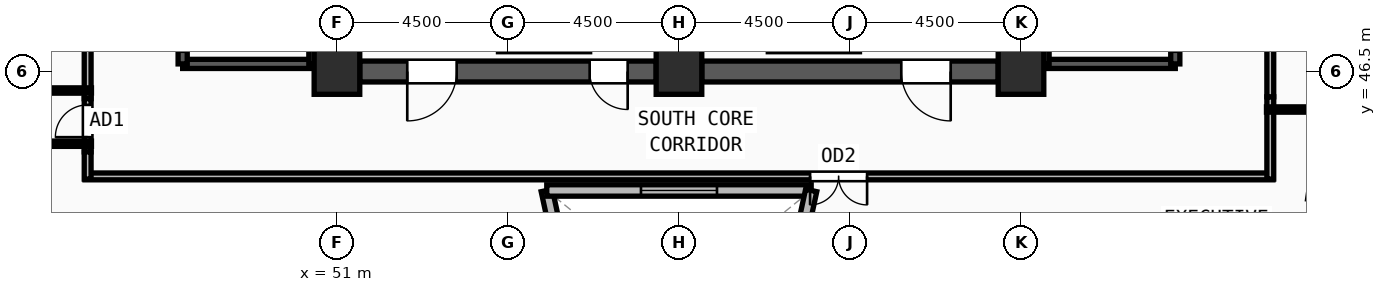
"""IFC4 building model, lengths in metres.
Left out: names, types, materials, properties, quantities, classifications, styles, units other than length and angle.
Written with IfcOpenShell. Run it as: python <this file> out.ifc"""

import sys

from ifc_helpers import new_model, si_unit, direction, frame, frame_2d, origin, origin_2d, place, context, subcontext, project, spatial, rectangle, extrude, source, transform, mapped, element, fill, save


model = new_model("IFC4")
c1 = context("Model", 3, precision=1e-05, world=origin(), true_north=direction((0.0, 1.0)))
c2 = subcontext(c1, "Body", "Model", "MODEL_VIEW")
j1 = project(units=[si_unit("LENGTHUNIT", "METRE"), si_unit("PLANEANGLEUNIT", "RADIAN")], contexts=[c1])
p1 = place(None, origin())
s1 = spatial("IfcSite", under=j1, at=p1, CompositionType="ELEMENT")
p2 = place(p1, origin())
s2 = spatial("IfcBuilding", under=s1, at=p2, CompositionType="ELEMENT")
p3 = place(p2, frame((0.0, 0.0, 297.75)))
s3 = spatial("IfcBuildingStorey", under=s2, at=p3, CompositionType="ELEMENT", Elevation=297.75)
m1 = source(origin(), c2, "Body", "SweptSolid", [
    extrude(rectangle(XDim=1.2, YDim=1.2, at=origin_2d()), origin(), (0.0, 0.0, 1.0), 3.75),
])
for number, where, z_axis, x_axis in (
    (1, (51.0, 46.5, 0.0), (0.0, 0.0, 1.0), (1.0, 0.0, 0.0)),
    (2, (60.0, 46.5, 0.0), (0.0, 0.0, 1.0), (1.0, 0.0, 0.0)),
    (3, (69.0, 46.5, 0.0), (0.0, 0.0, 1.0), (1.0, 0.0, 0.0)),
):
    element("IfcColumn", number, at=place(p3, frame(where, z_axis=z_axis, x_axis=x_axis)), inside=s3, PredefinedType="COLUMN", context=c2, shape_type="MappedRepresentation", body=[
        mapped(m1, transform((0.0, 0.0, 0.0), x_axis=(1.0, 0.0, 0.0), y_axis=(0.0, 1.0, 0.0), z_axis=(0.0, 0.0, 1.0), scale=1.0)),
    ])
p4 = place(p3, frame((39.903, 44.472, 0.0), z_axis=(0.0, 0.0, 1.0), x_axis=(0.556589940211, -0.830787360554, 0.0)))
e4 = element("IfcWall", 4, at=p4, inside=s3, PredefinedType="SOLIDWALL", context=c2, shape_type="SweptSolid", body=[
    extrude(rectangle(XDim=26.693, YDim=0.38, at=frame_2d((13.346, 0.0))), origin(), (0.0, 0.0, 1.0), 3.57),
])
m2 = source(origin(), c2, "Body", "SweptSolid", [
    extrude(rectangle(XDim=1.35, YDim=1.85, at=frame_2d((0.675, 0.925))), frame((0.0, 0.2, 0.0), z_axis=(0.0, -1.0, 0.0), x_axis=(1.0, 0.0, 0.0)), (0.0, 0.0, 1.0), 0.4),
])
p5 = place(p4, frame((5.998, 0.0, 0.55)))
e5 = element("IfcOpeningElement", 5, at=p5, cuts=e4, PredefinedType="OPENING", context=c2, shape_type="MappedRepresentation", body=[
    mapped(m2, transform((0.0, 0.0, 0.0), x_axis=(1.0, 0.0, 0.0), y_axis=(0.0, 1.0, 0.0), z_axis=(0.0, 0.0, 1.0), scale=1.0)),
])
p6 = place(p4, frame((12.671, 0.0, 0.55)))
e6 = element("IfcOpeningElement", 6, at=p6, cuts=e4, PredefinedType="OPENING", context=c2, shape_type="MappedRepresentation", body=[
    mapped(m2, transform((0.0, 0.0, 0.0), x_axis=(1.0, 0.0, 0.0), y_axis=(0.0, 1.0, 0.0), z_axis=(0.0, 0.0, 1.0), scale=1.0)),
])
p7 = place(p4, frame((19.345, 0.0, 0.55)))
e7 = element("IfcOpeningElement", 7, at=p7, cuts=e4, PredefinedType="OPENING", context=c2, shape_type="MappedRepresentation", body=[
    mapped(m2, transform((0.0, 0.0, 0.0), x_axis=(1.0, 0.0, 0.0), y_axis=(0.0, 1.0, 0.0), z_axis=(0.0, 0.0, 1.0), scale=1.0)),
])
p8 = place(p3, frame((68.4, 46.5, 0.0), z_axis=(0.0, 0.0, 1.0), x_axis=(-1.0, 0.0, 0.0)))
e8 = element("IfcWall", 8, at=p8, inside=s3, PredefinedType="SHEAR", context=c2, shape_type="SweptSolid", body=[
    extrude(rectangle(XDim=7.8, YDim=0.55, at=frame_2d((3.9, 0.0))), origin(), (0.0, 0.0, 1.0), 3.57),
])
m3 = source(origin(), c2, "Body", "SweptSolid", [
    extrude(rectangle(XDim=1.3, YDim=2.2, at=frame_2d((0.65, 1.1))), frame((0.0, 0.285, 0.0), z_axis=(0.0, -1.0, 0.0), x_axis=(1.0, 0.0, 0.0)), (0.0, 0.0, 1.0), 0.57),
])
p9 = place(p8, frame((1.25, 0.0, 0.0)))
e9 = element("IfcOpeningElement", 9, at=p9, cuts=e8, PredefinedType="OPENING", context=c2, shape_type="MappedRepresentation", body=[
    mapped(m3, transform((0.0, 0.0, 0.0), x_axis=(1.0, 0.0, 0.0), y_axis=(0.0, 1.0, 0.0), z_axis=(0.0, 0.0, 1.0), scale=1.0)),
])
p10 = place(p3, frame((59.4, 46.5, 0.0), z_axis=(0.0, 0.0, 1.0), x_axis=(-1.0, 0.0, 0.0)))
e10 = element("IfcWall", 10, at=p10, inside=s3, PredefinedType="SHEAR", context=c2, shape_type="SweptSolid", body=[
    extrude(rectangle(XDim=7.8, YDim=0.55, at=frame_2d((3.9, 0.0))), origin(), (0.0, 0.0, 1.0), 3.57),
])
p11 = place(p10, frame((5.25, 0.0, 0.0)))
e11 = element("IfcOpeningElement", 11, at=p11, cuts=e10, PredefinedType="OPENING", context=c2, shape_type="MappedRepresentation", body=[
    mapped(m3, transform((0.0, 0.0, 0.0), x_axis=(1.0, 0.0, 0.0), y_axis=(0.0, 1.0, 0.0), z_axis=(0.0, 0.0, 1.0), scale=1.0)),
])
m4 = source(origin(), c2, "Body", "SweptSolid", [
    extrude(rectangle(XDim=1.0, YDim=2.2, at=frame_2d((0.5, 1.1))), frame((0.0, 0.285, 0.0), z_axis=(0.0, -1.0, 0.0), x_axis=(1.0, 0.0, 0.0)), (0.0, 0.0, 1.0), 0.57),
])
p12 = place(p10, frame((0.75, 0.0, 0.0)))
e12 = element("IfcOpeningElement", 12, at=p12, cuts=e10, PredefinedType="OPENING", context=c2, shape_type="MappedRepresentation", body=[
    mapped(m4, transform((0.0, 0.0, 0.0), x_axis=(1.0, 0.0, 0.0), y_axis=(0.0, 1.0, 0.0), z_axis=(0.0, 0.0, 1.0), scale=1.0)),
])
p13 = place(p3, frame((46.94, 46.7, 0.0), z_axis=(0.0, 0.0, 1.0), x_axis=(1.0, 0.0, 0.0)))
e13 = element("IfcWall", 13, at=p13, inside=s3, PredefinedType="SOLIDWALL", context=c2, shape_type="SweptSolid", body=[
    extrude(rectangle(XDim=3.44, YDim=0.24, at=frame_2d((1.72, 0.0))), origin(), (0.0, 0.0, 1.0), 3.57),
])
p14 = place(p3, frame((50.38, 46.7, 0.0), z_axis=(0.0, 0.0, 1.0), x_axis=(0.0, 1.0, 0.0)))
e14 = element("IfcWall", 14, at=p14, inside=s3, PredefinedType="SOLIDWALL", context=c2, shape_type="SweptSolid", body=[
    extrude(rectangle(XDim=7.82, YDim=0.24, at=frame_2d((3.91, 0.0))), origin(), (0.0, 0.0, 1.0), 3.57),
])
p15 = place(p3, frame((46.94, 54.52, 0.0), z_axis=(0.0, 0.0, 1.0), x_axis=(0.0, -1.0, 0.0)))
e15 = element("IfcWall", 15, at=p15, inside=s3, PredefinedType="SOLIDWALL", context=c2, shape_type="SweptSolid", body=[
    extrude(rectangle(XDim=7.82, YDim=0.24, at=frame_2d((3.91, 0.0))), origin(), (0.0, 0.0, 1.0), 3.57),
])
m5 = source(origin(), c2, "Body", "SweptSolid", [
    extrude(rectangle(XDim=1.2, YDim=2.2, at=frame_2d((0.6, 1.1))), frame((0.0, 0.13, 0.0), z_axis=(0.0, -1.0, 0.0), x_axis=(1.0, 0.0, 0.0)), (0.0, 0.0, 1.0), 0.26),
])
p16 = place(p15, frame((6.3, 0.0, 0.0)))
e16 = element("IfcOpeningElement", 16, at=p16, cuts=e15, PredefinedType="OPENING", context=c2, shape_type="MappedRepresentation", body=[
    mapped(m5, transform((0.0, 0.0, 0.0), x_axis=(1.0, 0.0, 0.0), y_axis=(0.0, 1.0, 0.0), z_axis=(0.0, 0.0, 1.0), scale=1.0)),
])
p17 = place(p3, frame((69.62, 46.7, 0.0), z_axis=(0.0, 0.0, 1.0), x_axis=(1.0, 0.0, 0.0)))
e17 = element("IfcWall", 17, at=p17, inside=s3, PredefinedType="SOLIDWALL", context=c2, shape_type="SweptSolid", body=[
    extrude(rectangle(XDim=3.44, YDim=0.24, at=frame_2d((1.72, 0.0))), origin(), (0.0, 0.0, 1.0), 3.57),
])
p18 = place(p3, frame((73.06, 46.7, 0.0), z_axis=(0.0, 0.0, 1.0), x_axis=(0.0, 1.0, 0.0)))
e18 = element("IfcWall", 18, at=p18, inside=s3, PredefinedType="SOLIDWALL", context=c2, shape_type="SweptSolid", body=[
    extrude(rectangle(XDim=7.82, YDim=0.24, at=frame_2d((3.91, 0.0))), origin(), (0.0, 0.0, 1.0), 3.57),
])
p19 = place(p18, frame((0.32, 0.0, 0.0)))
e19 = element("IfcOpeningElement", 19, at=p19, cuts=e18, PredefinedType="OPENING", context=c2, shape_type="MappedRepresentation", body=[
    mapped(m5, transform((0.0, 0.0, 0.0), x_axis=(1.0, 0.0, 0.0), y_axis=(0.0, 1.0, 0.0), z_axis=(0.0, 0.0, 1.0), scale=1.0)),
])
p20 = place(p3, frame((69.62, 54.52, 0.0), z_axis=(0.0, 0.0, 1.0), x_axis=(0.0, -1.0, 0.0)))
e20 = element("IfcWall", 20, at=p20, inside=s3, PredefinedType="SOLIDWALL", context=c2, shape_type="SweptSolid", body=[
    extrude(rectangle(XDim=7.82, YDim=0.24, at=frame_2d((3.91, 0.0))), origin(), (0.0, 0.0, 1.0), 3.57),
])
p21 = place(p3, frame((57.739, 37.74, 0.0), z_axis=(0.0, 0.0, 1.0), x_axis=(-0.211447694839, 0.977389314627, 0.0)))
e21 = element("IfcWall", 21, at=p21, inside=s3, PredefinedType="SOLIDWALL", context=c2, shape_type="SweptSolid", body=[
    extrude(rectangle(XDim=5.76, YDim=0.3, at=frame_2d((2.88, 0.0))), origin(), (0.0, 0.0, 1.0), 3.57),
])
m6 = source(origin(), c2, "Body", "SweptSolid", [
    extrude(rectangle(XDim=2.0, YDim=1.9, at=frame_2d((1.0, 0.95))), frame((0.0, 0.16, 0.0), z_axis=(0.0, -1.0, 0.0), x_axis=(1.0, 0.0, 0.0)), (0.0, 0.0, 1.0), 0.32),
])
p22 = place(p21, frame((1.88, 0.0, 0.55)))
e22 = element("IfcOpeningElement", 22, at=p22, cuts=e21, PredefinedType="OPENING", context=c2, shape_type="MappedRepresentation", body=[
    mapped(m6, transform((0.0, 0.0, 0.0), x_axis=(1.0, 0.0, 0.0), y_axis=(0.0, 1.0, 0.0), z_axis=(0.0, 0.0, 1.0), scale=1.0)),
])
p23 = place(p3, frame((56.521, 43.37, 0.0), z_axis=(0.0, 0.0, 1.0), x_axis=(1.0, 0.0, 0.0)))
e23 = element("IfcWall", 23, at=p23, inside=s3, PredefinedType="SOLIDWALL", context=c2, shape_type="SweptSolid", body=[
    extrude(rectangle(XDim=6.958, YDim=0.3, at=frame_2d((3.479, 0.0))), origin(), (0.0, 0.0, 1.0), 3.57),
])
p24 = place(p23, frame((2.479, 0.0, 0.55)))
e24 = element("IfcOpeningElement", 24, at=p24, cuts=e23, PredefinedType="OPENING", context=c2, shape_type="MappedRepresentation", body=[
    mapped(m6, transform((0.0, 0.0, 0.0), x_axis=(1.0, 0.0, 0.0), y_axis=(0.0, 1.0, 0.0), z_axis=(0.0, 0.0, 1.0), scale=1.0)),
])
p25 = place(p3, frame((63.479, 43.37, 0.0), z_axis=(0.0, 0.0, 1.0), x_axis=(-0.211447694839, -0.977389314627, 0.0)))
e25 = element("IfcWall", 25, at=p25, inside=s3, PredefinedType="SOLIDWALL", context=c2, shape_type="SweptSolid", body=[
    extrude(rectangle(XDim=5.76, YDim=0.3, at=frame_2d((2.88, 0.0))), origin(), (0.0, 0.0, 1.0), 3.57),
])
p26 = place(p25, frame((1.88, 0.0, 0.55)))
e26 = element("IfcOpeningElement", 26, at=p26, cuts=e25, PredefinedType="OPENING", context=c2, shape_type="MappedRepresentation", body=[
    mapped(m6, transform((0.0, 0.0, 0.0), x_axis=(1.0, 0.0, 0.0), y_axis=(0.0, 1.0, 0.0), z_axis=(0.0, 0.0, 1.0), scale=1.0)),
])
p27 = place(p3, frame((44.44, 45.785, 0.0), z_axis=(0.0, 0.0, 1.0), x_axis=(0.0, 1.0, 0.0)))
e27 = element("IfcWall", 27, at=p27, inside=s3, PredefinedType="PARTITIONING", context=c2, shape_type="SweptSolid", body=[
    extrude(rectangle(XDim=9.5, YDim=0.18, at=frame_2d((4.75, 0.0))), origin(), (0.0, 0.0, 1.0), 3.261),
])
m7 = source(origin(), c2, "Body", "SweptSolid", [
    extrude(rectangle(XDim=1.0, YDim=2.2, at=frame_2d((0.5, 1.1))), frame((0.0, 0.1, 0.0), z_axis=(0.0, -1.0, 0.0), x_axis=(1.0, 0.0, 0.0)), (0.0, 0.0, 1.0), 0.2),
])
p28 = place(p27, frame((4.25, 0.0, 0.0)))
e28 = element("IfcOpeningElement", 28, at=p28, cuts=e27, PredefinedType="OPENING", context=c2, shape_type="MappedRepresentation", body=[
    mapped(m7, transform((0.0, 0.0, 0.0), x_axis=(1.0, 0.0, 0.0), y_axis=(0.0, 1.0, 0.0), z_axis=(0.0, 0.0, 1.0), scale=1.0)),
])
p29 = place(p3, frame((44.44, 44.385, 0.0), z_axis=(0.0, 0.0, 1.0), x_axis=(0.0, 1.0, 0.0)))
e29 = element("IfcWall", 29, at=p29, inside=s3, PredefinedType="PARTITIONING", context=c2, shape_type="SweptSolid", body=[
    extrude(rectangle(XDim=1.4, YDim=0.18, at=frame_2d((0.7, 0.0))), origin(), (0.0, 0.0, 1.0), 3.57),
])
m8 = source(origin(), c2, "Body", "SweptSolid", [
    extrude(rectangle(XDim=0.85, YDim=2.1, at=frame_2d((0.425, 1.05))), frame((0.0, 0.1, 0.0), z_axis=(0.0, -1.0, 0.0), x_axis=(1.0, 0.0, 0.0)), (0.0, 0.0, 1.0), 0.2),
])
p30 = place(p29, frame((0.387, 0.0, 0.0)))
e30 = element("IfcOpeningElement", 30, at=p30, cuts=e29, PredefinedType="OPENING", context=c2, shape_type="MappedRepresentation", body=[
    mapped(m8, transform((0.0, 0.0, 0.0), x_axis=(1.0, 0.0, 0.0), y_axis=(0.0, 1.0, 0.0), z_axis=(0.0, 0.0, 1.0), scale=1.0)),
])
p31 = place(p3, frame((75.63, 43.74, 0.0), z_axis=(0.0, 0.0, 1.0), x_axis=(-1.0, 0.0, 0.0)))
e31 = element("IfcWall", 31, at=p31, inside=s3, PredefinedType="PARTITIONING", context=c2, shape_type="SweptSolid", body=[
    extrude(rectangle(XDim=31.26, YDim=0.18, at=frame_2d((15.63, 0.0))), origin(), (0.0, 0.0, 1.0), 3.57),
])
m9 = source(origin(), c2, "Body", "SweptSolid", [
    extrude(rectangle(XDim=1.5, YDim=2.2, at=frame_2d((0.75, 1.1))), frame((0.0, 0.1, 0.0), z_axis=(0.0, -1.0, 0.0), x_axis=(1.0, 0.0, 0.0)), (0.0, 0.0, 1.0), 0.2),
])
p32 = place(p31, frame((10.68, 0.0, 0.0)))
e32 = element("IfcOpeningElement", 32, at=p32, cuts=e31, PredefinedType="OPENING", context=c2, shape_type="MappedRepresentation", body=[
    mapped(m9, transform((0.0, 0.0, 0.0), x_axis=(1.0, 0.0, 0.0), y_axis=(0.0, 1.0, 0.0), z_axis=(0.0, 0.0, 1.0), scale=1.0)),
])
p33 = place(p3, frame((75.56, 45.835, 0.0), z_axis=(0.0, 0.0, 1.0), x_axis=(0.0, -1.0, 0.0)))
e33 = element("IfcWall", 33, at=p33, inside=s3, PredefinedType="PARTITIONING", context=c2, shape_type="SweptSolid", body=[
    extrude(rectangle(XDim=2.165, YDim=0.18, at=frame_2d((1.083, 0.0))), origin(), (0.0, 0.0, 1.0), 3.57),
])
p34 = place(p3, frame((44.44, 43.67, 0.0), z_axis=(0.0, 0.0, 1.0), x_axis=(0.0, 1.0, 0.0)))
e34 = element("IfcWall", 34, at=p34, inside=s3, PredefinedType="PARTITIONING", context=c2, shape_type="SweptSolid", body=[
    extrude(rectangle(XDim=0.715, YDim=0.18, at=frame_2d((0.357, 0.0))), origin(), (0.0, 0.0, 1.0), 3.57),
])
p35 = place(p3, frame((75.56, 48.21, 0.0), z_axis=(0.0, 0.0, 1.0), x_axis=(0.0, -1.0, 0.0)))
e35 = element("IfcWall", 35, at=p35, inside=s3, PredefinedType="PARTITIONING", context=c2, shape_type="SweptSolid", body=[
    extrude(rectangle(XDim=2.375, YDim=0.18, at=frame_2d((1.188, 0.0))), origin(), (0.0, 0.0, 1.0), 3.57),
])
p36 = place(p3, frame((44.54, 44.6, 0.0), z_axis=(0.0, 0.0, 1.0), x_axis=(-1.0, 0.0, 0.0)))
e36 = element("IfcWall", 36, at=p36, inside=s3, PredefinedType="PARTITIONING", context=c2, shape_type="SweptSolid", body=[
    extrude(rectangle(XDim=5.481, YDim=0.14, at=frame_2d((2.74, 0.0))), origin(), (0.0, 0.0, 1.0), 3.57),
])
p37 = place(p3, frame((44.54, 46.0, 0.0), z_axis=(0.0, 0.0, 1.0), x_axis=(-1.0, 0.0, 0.0)))
e37 = element("IfcWall", 37, at=p37, inside=s3, PredefinedType="PARTITIONING", context=c2, shape_type="SweptSolid", body=[
    extrude(rectangle(XDim=6.148, YDim=0.14, at=frame_2d((3.074, 0.0))), origin(), (0.0, 0.0, 1.0), 3.57),
])
p38 = place(p3, frame((75.46, 45.5, 0.0), z_axis=(0.0, 0.0, 1.0), x_axis=(1.0, 0.0, 0.0)))
e38 = element("IfcWall", 38, at=p38, inside=s3, PredefinedType="PARTITIONING", context=c2, shape_type="SweptSolid", body=[
    extrude(rectangle(XDim=5.578, YDim=0.14, at=frame_2d((2.789, 0.0))), origin(), (0.0, 0.0, 1.0), 3.57),
])
m10 = source(origin(), c2, "Body", "SweptSolid", [
    extrude(rectangle(XDim=1.3, YDim=2.2, at=frame_2d((0.65, 1.1))), frame((0.0, 0.025, 0.0), z_axis=(0.0, -1.0, 0.0), x_axis=(1.0, 0.0, 0.0)), (0.0, 0.0, 1.0), 0.05),
])
p39 = place(p11, origin())
e39 = element("IfcDoor", 39, at=p39, inside=s3, OperationType="SINGLE_SWING_RIGHT", PredefinedType="DOOR", context=c2, shape_type="MappedRepresentation", body=[
    mapped(m10, transform((0.0, 0.0, 0.0), x_axis=(1.0, 0.0, 0.0), y_axis=(0.0, 1.0, 0.0), z_axis=(0.0, 0.0, 1.0), scale=1.0)),
])
fill(e11, e39)
m11 = source(origin(), c2, "Body", "SweptSolid", [
    extrude(rectangle(XDim=1.0, YDim=2.2, at=frame_2d((0.5, 1.1))), frame((0.0, 0.025, 0.0), z_axis=(0.0, -1.0, 0.0), x_axis=(1.0, 0.0, 0.0)), (0.0, 0.0, 1.0), 0.05),
])
p40 = place(p12, origin())
e40 = element("IfcDoor", 40, at=p40, inside=s3, OperationType="SINGLE_SWING_LEFT", PredefinedType="DOOR", context=c2, shape_type="MappedRepresentation", body=[
    mapped(m11, transform((0.0, 0.0, 0.0), x_axis=(1.0, 0.0, 0.0), y_axis=(0.0, 1.0, 0.0), z_axis=(0.0, 0.0, 1.0), scale=1.0)),
])
fill(e12, e40)
p41 = place(p9, origin())
e41 = element("IfcDoor", 41, at=p41, inside=s3, OperationType="SINGLE_SWING_LEFT", PredefinedType="DOOR", context=c2, shape_type="MappedRepresentation", body=[
    mapped(m10, transform((0.0, 0.0, 0.0), x_axis=(1.0, 0.0, 0.0), y_axis=(0.0, 1.0, 0.0), z_axis=(0.0, 0.0, 1.0), scale=1.0)),
])
fill(e9, e41)
m12 = source(origin(), c2, "Body", "SweptSolid", [
    extrude(rectangle(XDim=2.0, YDim=1.9, at=frame_2d((1.0, 0.95))), frame((0.0, 0.03, 0.0), z_axis=(0.0, -1.0, 0.0), x_axis=(1.0, 0.0, 0.0)), (0.0, 0.0, 1.0), 0.06),
])
p42 = place(p24, origin())
e42 = element("IfcWindow", 42, at=p42, inside=s3, PartitioningType="DOUBLE_PANEL_VERTICAL", PredefinedType="WINDOW", context=c2, shape_type="MappedRepresentation", body=[
    mapped(m12, transform((0.0, 0.0, 0.0), x_axis=(1.0, 0.0, 0.0), y_axis=(0.0, 1.0, 0.0), z_axis=(0.0, 0.0, 1.0), scale=1.0)),
])
fill(e24, e42)
m13 = source(origin(), c2, "Body", "SweptSolid", [
    extrude(rectangle(XDim=0.85, YDim=2.1, at=frame_2d((0.425, 1.05))), frame((0.0, 0.025, 0.0), z_axis=(0.0, -1.0, 0.0), x_axis=(1.0, 0.0, 0.0)), (0.0, 0.0, 1.0), 0.05),
])
p43 = place(p30, origin())
e43 = element("IfcDoor", 43, at=p43, inside=s3, OperationType="SINGLE_SWING_LEFT", PredefinedType="DOOR", context=c2, shape_type="MappedRepresentation", body=[
    mapped(m13, transform((0.0, 0.0, 0.0), x_axis=(1.0, 0.0, 0.0), y_axis=(0.0, 1.0, 0.0), z_axis=(0.0, 0.0, 1.0), scale=1.0)),
])
fill(e30, e43)
m14 = source(origin(), c2, "Body", "SweptSolid", [
    extrude(rectangle(XDim=1.5, YDim=2.2, at=frame_2d((0.75, 1.1))), frame((0.0, 0.025, 0.0), z_axis=(0.0, -1.0, 0.0), x_axis=(1.0, 0.0, 0.0)), (0.0, 0.0, 1.0), 0.05),
])
p44 = place(p32, origin())
e44 = element("IfcDoor", 44, at=p44, inside=s3, OperationType="DOUBLE_DOOR_SINGLE_SWING", PredefinedType="DOOR", context=c2, shape_type="MappedRepresentation", body=[
    mapped(m14, transform((0.0, 0.0, 0.0), x_axis=(1.0, 0.0, 0.0), y_axis=(0.0, 1.0, 0.0), z_axis=(0.0, 0.0, 1.0), scale=1.0)),
])
fill(e32, e44)
save(model, sys.argv[1])
